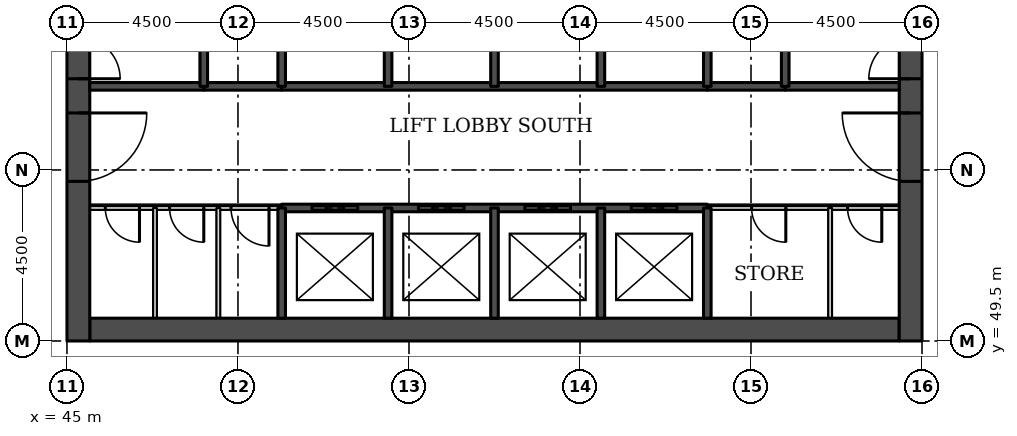
"""IFC4 building model, lengths in metres.
Left out: names, types, materials, properties, quantities, classifications, styles, units other than length and angle.
Written with IfcOpenShell. Run it as: python <this file> out.ifc"""

import sys

from ifc_helpers import new_model, si_unit, direction, frame, frame_2d, origin, place, context, subcontext, project, spatial, rectangle, extrude, element, fill, save


model = new_model("IFC4")
c1 = context("Model", 3, precision=1e-05, world=origin(), true_north=direction((0.0, 1.0)))
c2 = subcontext(c1, "Body", "Model", "MODEL_VIEW")
j1 = project(units=[si_unit("LENGTHUNIT", "METRE"), si_unit("PLANEANGLEUNIT", "RADIAN")], contexts=[c1])
p1 = place(None, origin())
s1 = spatial("IfcSite", under=j1, at=p1, CompositionType="ELEMENT")
p2 = place(p1, origin())
s2 = spatial("IfcBuilding", under=s1, at=p2, CompositionType="ELEMENT")
p3 = place(p2, frame((0.0, 0.0, 8.0)))
s3 = spatial("IfcBuildingStorey", under=s2, at=p3, CompositionType="ELEMENT", Elevation=8.0)
p4 = place(p3, frame((45.6, 49.8, 0.0), z_axis=(0.0, 0.0, 1.0), x_axis=(1.0, 0.0, 0.0)))
e1 = element("IfcWall", 1, at=p4, inside=s3, PredefinedType="SHEAR", context=c2, shape_type="SweptSolid", body=[
    extrude(rectangle(XDim=21.3, YDim=0.6, at=frame_2d((10.65, 0.0))), origin(), (0.0, 0.0, 1.0), 5.5),
])
p5 = place(p3, frame((45.3, 49.5, 0.0), z_axis=(0.0, 0.0, 1.0), x_axis=(0.0, 1.0, 0.0)))
e2 = element("IfcWall", 2, at=p5, inside=s3, PredefinedType="SHEAR", context=c2, shape_type="SweptSolid", body=[
    extrude(rectangle(XDim=22.5, YDim=0.6, at=frame_2d((11.25, 0.0))), origin(), (0.0, 0.0, 1.0), 5.5),
])
p6 = place(p5, frame((4.2, 0.0, 0.0)))
e3 = element("IfcOpeningElement", 3, at=p6, cuts=e2, PredefinedType="OPENING", context=c2, shape_type="SweptSolid", body=[
    extrude(rectangle(XDim=1.8, YDim=2.1, at=frame_2d((0.9, 1.05))), frame((0.0, 0.31, 0.0), z_axis=(0.0, -1.0, 0.0), x_axis=(1.0, 0.0, 0.0)), (0.0, 0.0, 1.0), 0.62),
])
p7 = place(p5, frame((6.9, 0.0, 0.0)))
e4 = element("IfcOpeningElement", 4, at=p7, cuts=e2, PredefinedType="OPENING", context=c2, shape_type="SweptSolid", body=[
    extrude(rectangle(XDim=1.1, YDim=2.1, at=frame_2d((0.55, 1.05))), frame((0.0, 0.31, 0.0), z_axis=(0.0, -1.0, 0.0), x_axis=(1.0, 0.0, 0.0)), (0.0, 0.0, 1.0), 0.62),
])
p8 = place(p5, frame((13.6, 0.0, 0.0)))
e5 = element("IfcOpeningElement", 5, at=p8, cuts=e2, PredefinedType="OPENING", context=c2, shape_type="SweptSolid", body=[
    extrude(rectangle(XDim=1.1, YDim=2.1, at=frame_2d((0.55, 1.05))), frame((0.0, 0.31, 0.0), z_axis=(0.0, -1.0, 0.0), x_axis=(1.0, 0.0, 0.0)), (0.0, 0.0, 1.0), 0.62),
])
p9 = place(p5, frame((16.5, 0.0, 0.0)))
e6 = element("IfcOpeningElement", 6, at=p9, cuts=e2, PredefinedType="OPENING", context=c2, shape_type="SweptSolid", body=[
    extrude(rectangle(XDim=1.8, YDim=2.1, at=frame_2d((0.9, 1.05))), frame((0.0, 0.31, 0.0), z_axis=(0.0, -1.0, 0.0), x_axis=(1.0, 0.0, 0.0)), (0.0, 0.0, 1.0), 0.62),
])
p10 = place(p3, frame((67.2, 49.5, 0.0), z_axis=(0.0, 0.0, 1.0), x_axis=(0.0, 1.0, 0.0)))
e7 = element("IfcWall", 7, at=p10, inside=s3, PredefinedType="SHEAR", context=c2, shape_type="SweptSolid", body=[
    extrude(rectangle(XDim=22.5, YDim=0.6, at=frame_2d((11.25, 0.0))), origin(), (0.0, 0.0, 1.0), 5.5),
])
p11 = place(p10, frame((4.2, 0.0, 0.0)))
e8 = element("IfcOpeningElement", 8, at=p11, cuts=e7, PredefinedType="OPENING", context=c2, shape_type="SweptSolid", body=[
    extrude(rectangle(XDim=1.8, YDim=2.1, at=frame_2d((0.9, 1.05))), frame((0.0, 0.31, 0.0), z_axis=(0.0, -1.0, 0.0), x_axis=(1.0, 0.0, 0.0)), (0.0, 0.0, 1.0), 0.62),
])
p12 = place(p10, frame((6.9, 0.0, 0.0)))
e9 = element("IfcOpeningElement", 9, at=p12, cuts=e7, PredefinedType="OPENING", context=c2, shape_type="SweptSolid", body=[
    extrude(rectangle(XDim=1.1, YDim=2.1, at=frame_2d((0.55, 1.05))), frame((0.0, 0.31, 0.0), z_axis=(0.0, -1.0, 0.0), x_axis=(1.0, 0.0, 0.0)), (0.0, 0.0, 1.0), 0.62),
])
p13 = place(p10, frame((13.6, 0.0, 0.0)))
e10 = element("IfcOpeningElement", 10, at=p13, cuts=e7, PredefinedType="OPENING", context=c2, shape_type="SweptSolid", body=[
    extrude(rectangle(XDim=1.1, YDim=2.1, at=frame_2d((0.55, 1.05))), frame((0.0, 0.31, 0.0), z_axis=(0.0, -1.0, 0.0), x_axis=(1.0, 0.0, 0.0)), (0.0, 0.0, 1.0), 0.62),
])
p14 = place(p10, frame((16.5, 0.0, 0.0)))
e11 = element("IfcOpeningElement", 11, at=p14, cuts=e7, PredefinedType="OPENING", context=c2, shape_type="SweptSolid", body=[
    extrude(rectangle(XDim=1.8, YDim=2.1, at=frame_2d((0.9, 1.05))), frame((0.0, 0.31, 0.0), z_axis=(0.0, -1.0, 0.0), x_axis=(1.0, 0.0, 0.0)), (0.0, 0.0, 1.0), 0.62),
])
p15 = place(p3, frame((45.6, 53.0, 0.0), z_axis=(0.0, 0.0, 1.0), x_axis=(1.0, 0.0, 0.0)))
e12 = element("IfcWall", 12, at=p15, inside=s3, PredefinedType="PARTITIONING", context=c2, shape_type="SweptSolid", body=[
    extrude(rectangle(XDim=5.05, YDim=0.1, at=frame_2d((2.525, 0.0))), origin(), (0.0, 0.0, 1.0), 5.15),
])
p16 = place(p15, frame((0.408, 0.0, 0.0)))
e13 = element("IfcOpeningElement", 13, at=p16, cuts=e12, PredefinedType="OPENING", context=c2, shape_type="SweptSolid", body=[
    extrude(rectangle(XDim=0.9, YDim=2.1, at=frame_2d((0.45, 1.05))), frame((0.0, 0.06, 0.0), z_axis=(0.0, -1.0, 0.0), x_axis=(1.0, 0.0, 0.0)), (0.0, 0.0, 1.0), 0.12),
])
p17 = place(p15, frame((2.1, 0.0, 0.0)))
e14 = element("IfcOpeningElement", 14, at=p17, cuts=e12, PredefinedType="OPENING", context=c2, shape_type="SweptSolid", body=[
    extrude(rectangle(XDim=0.9, YDim=2.1, at=frame_2d((0.45, 1.05))), frame((0.0, 0.06, 0.0), z_axis=(0.0, -1.0, 0.0), x_axis=(1.0, 0.0, 0.0)), (0.0, 0.0, 1.0), 0.12),
])
p18 = place(p15, frame((3.717, 0.0, 0.0)))
e15 = element("IfcOpeningElement", 15, at=p18, cuts=e12, PredefinedType="OPENING", context=c2, shape_type="SweptSolid", body=[
    extrude(rectangle(XDim=1.0, YDim=2.1, at=frame_2d((0.5, 1.05))), frame((0.0, 0.06, 0.0), z_axis=(0.0, -1.0, 0.0), x_axis=(1.0, 0.0, 0.0)), (0.0, 0.0, 1.0), 0.12),
])
p19 = place(p3, frame((61.85, 53.0, 0.0), z_axis=(0.0, 0.0, 1.0), x_axis=(1.0, 0.0, 0.0)))
e16 = element("IfcWall", 16, at=p19, inside=s3, PredefinedType="PARTITIONING", context=c2, shape_type="SweptSolid", body=[
    extrude(rectangle(XDim=5.05, YDim=0.1, at=frame_2d((2.525, 0.0))), origin(), (0.0, 0.0, 1.0), 5.15),
])
p20 = place(p19, frame((3.691, 0.0, 0.0)))
e17 = element("IfcOpeningElement", 17, at=p20, cuts=e16, PredefinedType="OPENING", context=c2, shape_type="SweptSolid", body=[
    extrude(rectangle(XDim=0.9, YDim=2.1, at=frame_2d((0.45, 1.05))), frame((0.0, 0.06, 0.0), z_axis=(0.0, -1.0, 0.0), x_axis=(1.0, 0.0, 0.0)), (0.0, 0.0, 1.0), 0.12),
])
p21 = place(p19, frame((1.166, 0.0, 0.0)))
e18 = element("IfcOpeningElement", 18, at=p21, cuts=e16, PredefinedType="OPENING", context=c2, shape_type="SweptSolid", body=[
    extrude(rectangle(XDim=0.9, YDim=2.1, at=frame_2d((0.45, 1.05))), frame((0.0, 0.06, 0.0), z_axis=(0.0, -1.0, 0.0), x_axis=(1.0, 0.0, 0.0)), (0.0, 0.0, 1.0), 0.12),
])
p22 = place(p3, frame((50.65, 53.0, 0.0), z_axis=(0.0, 0.0, 1.0), x_axis=(1.0, 0.0, 0.0)))
e19 = element("IfcWall", 19, at=p22, inside=s3, PredefinedType="SOLIDWALL", context=c2, shape_type="SweptSolid", body=[
    extrude(rectangle(XDim=11.2, YDim=0.2, at=frame_2d((5.6, 0.0))), origin(), (0.0, 0.0, 1.0), 5.15),
])
p23 = place(p22, frame((0.8, 0.0, 0.0)))
e20 = element("IfcOpeningElement", 20, at=p23, cuts=e19, PredefinedType="OPENING", context=c2, shape_type="SweptSolid", body=[
    extrude(rectangle(XDim=1.2, YDim=2.1, at=frame_2d((0.6, 1.05))), frame((0.0, 0.11, 0.0), z_axis=(0.0, -1.0, 0.0), x_axis=(1.0, 0.0, 0.0)), (0.0, 0.0, 1.0), 0.22),
])
p24 = place(p22, frame((3.6, 0.0, 0.0)))
e21 = element("IfcOpeningElement", 21, at=p24, cuts=e19, PredefinedType="OPENING", context=c2, shape_type="SweptSolid", body=[
    extrude(rectangle(XDim=1.2, YDim=2.1, at=frame_2d((0.6, 1.05))), frame((0.0, 0.11, 0.0), z_axis=(0.0, -1.0, 0.0), x_axis=(1.0, 0.0, 0.0)), (0.0, 0.0, 1.0), 0.22),
])
p25 = place(p22, frame((6.4, 0.0, 0.0)))
e22 = element("IfcOpeningElement", 22, at=p25, cuts=e19, PredefinedType="OPENING", context=c2, shape_type="SweptSolid", body=[
    extrude(rectangle(XDim=1.2, YDim=2.1, at=frame_2d((0.6, 1.05))), frame((0.0, 0.11, 0.0), z_axis=(0.0, -1.0, 0.0), x_axis=(1.0, 0.0, 0.0)), (0.0, 0.0, 1.0), 0.22),
])
p26 = place(p22, frame((9.2, 0.0, 0.0)))
e23 = element("IfcOpeningElement", 23, at=p26, cuts=e19, PredefinedType="OPENING", context=c2, shape_type="SweptSolid", body=[
    extrude(rectangle(XDim=1.2, YDim=2.1, at=frame_2d((0.6, 1.05))), frame((0.0, 0.11, 0.0), z_axis=(0.0, -1.0, 0.0), x_axis=(1.0, 0.0, 0.0)), (0.0, 0.0, 1.0), 0.22),
])
for number, where, z_axis, x_axis in (
    (24, (48.6, 56.2, 0.0), (0.0, 0.0, 1.0), (1.0, 0.0, 0.0)),
    (25, (61.85, 56.2, 0.0), (0.0, 0.0, 1.0), (1.0, 0.0, 0.0)),
):
    element("IfcWall", number, at=place(p3, frame(where, z_axis=z_axis, x_axis=x_axis)), inside=s3, PredefinedType="SOLIDWALL", context=c2, shape_type="SweptSolid", body=[
        extrude(rectangle(XDim=2.05, YDim=0.2, at=frame_2d((1.025, 0.0))), origin(), (0.0, 0.0, 1.0), 5.15),
    ])
p27 = place(p3, frame((45.6, 56.2, 0.0), z_axis=(0.0, 0.0, 1.0), x_axis=(1.0, 0.0, 0.0)))
e26 = element("IfcWall", 26, at=p27, inside=s3, PredefinedType="SOLIDWALL", context=c2, shape_type="SweptSolid", body=[
    extrude(rectangle(XDim=3.0, YDim=0.2, at=frame_2d((1.5, 0.0))), origin(), (0.0, 0.0, 1.0), 5.15),
])
p28 = place(p3, frame((50.65, 56.2, 0.0), z_axis=(0.0, 0.0, 1.0), x_axis=(1.0, 0.0, 0.0)))
e27 = element("IfcWall", 27, at=p28, inside=s3, PredefinedType="SOLIDWALL", context=c2, shape_type="SweptSolid", body=[
    extrude(rectangle(XDim=11.2, YDim=0.2, at=frame_2d((5.6, 0.0))), origin(), (0.0, 0.0, 1.0), 5.15),
])
p29 = place(p3, frame((63.9, 56.2, 0.0), z_axis=(0.0, 0.0, 1.0), x_axis=(1.0, 0.0, 0.0)))
e28 = element("IfcWall", 28, at=p29, inside=s3, PredefinedType="SOLIDWALL", context=c2, shape_type="SweptSolid", body=[
    extrude(rectangle(XDim=3.0, YDim=0.2, at=frame_2d((1.5, 0.0))), origin(), (0.0, 0.0, 1.0), 5.15),
])
p30 = place(p3, frame((47.317, 50.1, 0.0), z_axis=(0.0, 0.0, 1.0), x_axis=(0.0, 1.0, 0.0)))
e29 = element("IfcWall", 29, at=p30, inside=s3, PredefinedType="PARTITIONING", context=c2, shape_type="SweptSolid", body=[
    extrude(rectangle(XDim=2.9, YDim=0.1, at=frame_2d((1.45, 0.0))), origin(), (0.0, 0.0, 1.0), 5.15),
])
p31 = place(p3, frame((48.6, 56.2, 0.0), z_axis=(0.0, 0.0, 1.0), x_axis=(0.0, 1.0, 0.0)))
e30 = element("IfcWall", 30, at=p31, inside=s3, PredefinedType="SOLIDWALL", context=c2, shape_type="SweptSolid", body=[
    extrude(rectangle(XDim=5.8, YDim=0.2, at=frame_2d((2.9, 0.0))), origin(), (0.0, 0.0, 1.0), 5.15),
])
p32 = place(p3, frame((48.983, 50.1, 0.0), z_axis=(0.0, 0.0, 1.0), x_axis=(0.0, 1.0, 0.0)))
e31 = element("IfcWall", 31, at=p32, inside=s3, PredefinedType="PARTITIONING", context=c2, shape_type="SweptSolid", body=[
    extrude(rectangle(XDim=2.9, YDim=0.1, at=frame_2d((1.45, 0.0))), origin(), (0.0, 0.0, 1.0), 5.15),
])
p33 = place(p3, frame((50.65, 50.1, 0.0), z_axis=(0.0, 0.0, 1.0), x_axis=(0.0, 1.0, 0.0)))
e32 = element("IfcWall", 32, at=p33, inside=s3, PredefinedType="SOLIDWALL", context=c2, shape_type="SweptSolid", body=[
    extrude(rectangle(XDim=2.9, YDim=0.2, at=frame_2d((1.45, 0.0))), origin(), (0.0, 0.0, 1.0), 5.15),
])
p34 = place(p3, frame((50.65, 56.2, 0.0), z_axis=(0.0, 0.0, 1.0), x_axis=(0.0, 1.0, 0.0)))
e33 = element("IfcWall", 33, at=p34, inside=s3, PredefinedType="SOLIDWALL", context=c2, shape_type="SweptSolid", body=[
    extrude(rectangle(XDim=2.8, YDim=0.2, at=frame_2d((1.4, 0.0))), origin(), (0.0, 0.0, 1.0), 5.15),
])
p35 = place(p3, frame((53.45, 50.1, 0.0), z_axis=(0.0, 0.0, 1.0), x_axis=(0.0, 1.0, 0.0)))
e34 = element("IfcWall", 34, at=p35, inside=s3, PredefinedType="SOLIDWALL", context=c2, shape_type="SweptSolid", body=[
    extrude(rectangle(XDim=2.9, YDim=0.2, at=frame_2d((1.45, 0.0))), origin(), (0.0, 0.0, 1.0), 5.15),
])
p36 = place(p3, frame((53.45, 56.2, 0.0), z_axis=(0.0, 0.0, 1.0), x_axis=(0.0, 1.0, 0.0)))
e35 = element("IfcWall", 35, at=p36, inside=s3, PredefinedType="SOLIDWALL", context=c2, shape_type="SweptSolid", body=[
    extrude(rectangle(XDim=2.8, YDim=0.2, at=frame_2d((1.4, 0.0))), origin(), (0.0, 0.0, 1.0), 5.15),
])
p37 = place(p3, frame((56.25, 50.1, 0.0), z_axis=(0.0, 0.0, 1.0), x_axis=(0.0, 1.0, 0.0)))
e36 = element("IfcWall", 36, at=p37, inside=s3, PredefinedType="SOLIDWALL", context=c2, shape_type="SweptSolid", body=[
    extrude(rectangle(XDim=2.9, YDim=0.2, at=frame_2d((1.45, 0.0))), origin(), (0.0, 0.0, 1.0), 5.15),
])
p38 = place(p3, frame((56.25, 56.2, 0.0), z_axis=(0.0, 0.0, 1.0), x_axis=(0.0, 1.0, 0.0)))
e37 = element("IfcWall", 37, at=p38, inside=s3, PredefinedType="SOLIDWALL", context=c2, shape_type="SweptSolid", body=[
    extrude(rectangle(XDim=2.8, YDim=0.2, at=frame_2d((1.4, 0.0))), origin(), (0.0, 0.0, 1.0), 5.15),
])
p39 = place(p3, frame((59.05, 50.1, 0.0), z_axis=(0.0, 0.0, 1.0), x_axis=(0.0, 1.0, 0.0)))
e38 = element("IfcWall", 38, at=p39, inside=s3, PredefinedType="SOLIDWALL", context=c2, shape_type="SweptSolid", body=[
    extrude(rectangle(XDim=2.9, YDim=0.2, at=frame_2d((1.45, 0.0))), origin(), (0.0, 0.0, 1.0), 5.15),
])
p40 = place(p3, frame((59.05, 56.2, 0.0), z_axis=(0.0, 0.0, 1.0), x_axis=(0.0, 1.0, 0.0)))
e39 = element("IfcWall", 39, at=p40, inside=s3, PredefinedType="SOLIDWALL", context=c2, shape_type="SweptSolid", body=[
    extrude(rectangle(XDim=2.8, YDim=0.2, at=frame_2d((1.4, 0.0))), origin(), (0.0, 0.0, 1.0), 5.15),
])
p41 = place(p3, frame((61.85, 50.1, 0.0), z_axis=(0.0, 0.0, 1.0), x_axis=(0.0, 1.0, 0.0)))
e40 = element("IfcWall", 40, at=p41, inside=s3, PredefinedType="SOLIDWALL", context=c2, shape_type="SweptSolid", body=[
    extrude(rectangle(XDim=2.9, YDim=0.2, at=frame_2d((1.45, 0.0))), origin(), (0.0, 0.0, 1.0), 5.15),
])
p42 = place(p3, frame((61.85, 56.2, 0.0), z_axis=(0.0, 0.0, 1.0), x_axis=(0.0, 1.0, 0.0)))
e41 = element("IfcWall", 41, at=p42, inside=s3, PredefinedType="SOLIDWALL", context=c2, shape_type="SweptSolid", body=[
    extrude(rectangle(XDim=2.8, YDim=0.2, at=frame_2d((1.4, 0.0))), origin(), (0.0, 0.0, 1.0), 5.15),
])
p43 = place(p3, frame((63.9, 56.2, 0.0), z_axis=(0.0, 0.0, 1.0), x_axis=(0.0, 1.0, 0.0)))
e42 = element("IfcWall", 42, at=p43, inside=s3, PredefinedType="SOLIDWALL", context=c2, shape_type="SweptSolid", body=[
    extrude(rectangle(XDim=5.8, YDim=0.2, at=frame_2d((2.9, 0.0))), origin(), (0.0, 0.0, 1.0), 5.15),
])
p44 = place(p3, frame((65.082, 50.1, 0.0), z_axis=(0.0, 0.0, 1.0), x_axis=(0.0, 1.0, 0.0)))
e43 = element("IfcWall", 43, at=p44, inside=s3, PredefinedType="PARTITIONING", context=c2, shape_type="SweptSolid", body=[
    extrude(rectangle(XDim=2.9, YDim=0.1, at=frame_2d((1.45, 0.0))), origin(), (0.0, 0.0, 1.0), 5.15),
])
p45 = place(p23, origin())
e44 = element("IfcDoor", 44, at=p45, inside=s3, OperationType="DOUBLE_DOOR_SLIDING", PredefinedType="DOOR", context=c2, shape_type="SweptSolid", body=[
    extrude(rectangle(XDim=1.2, YDim=2.1, at=frame_2d((0.6, 1.05))), frame((0.0, 0.025, 0.0), z_axis=(0.0, -1.0, 0.0), x_axis=(1.0, 0.0, 0.0)), (0.0, 0.0, 1.0), 0.05),
])
fill(e20, e44)
p46 = place(p24, origin())
e45 = element("IfcDoor", 45, at=p46, inside=s3, OperationType="DOUBLE_DOOR_SLIDING", PredefinedType="DOOR", context=c2, shape_type="SweptSolid", body=[
    extrude(rectangle(XDim=1.2, YDim=2.1, at=frame_2d((0.6, 1.05))), frame((0.0, 0.025, 0.0), z_axis=(0.0, -1.0, 0.0), x_axis=(1.0, 0.0, 0.0)), (0.0, 0.0, 1.0), 0.05),
])
fill(e21, e45)
p47 = place(p25, origin())
e46 = element("IfcDoor", 46, at=p47, inside=s3, OperationType="DOUBLE_DOOR_SLIDING", PredefinedType="DOOR", context=c2, shape_type="SweptSolid", body=[
    extrude(rectangle(XDim=1.2, YDim=2.1, at=frame_2d((0.6, 1.05))), frame((0.0, 0.025, 0.0), z_axis=(0.0, -1.0, 0.0), x_axis=(1.0, 0.0, 0.0)), (0.0, 0.0, 1.0), 0.05),
])
fill(e22, e46)
p48 = place(p26, origin())
e47 = element("IfcDoor", 47, at=p48, inside=s3, OperationType="DOUBLE_DOOR_SLIDING", PredefinedType="DOOR", context=c2, shape_type="SweptSolid", body=[
    extrude(rectangle(XDim=1.2, YDim=2.1, at=frame_2d((0.6, 1.05))), frame((0.0, 0.025, 0.0), z_axis=(0.0, -1.0, 0.0), x_axis=(1.0, 0.0, 0.0)), (0.0, 0.0, 1.0), 0.05),
])
fill(e23, e47)
p49 = place(p6, frame((1.8, 0.0, 0.0), z_axis=(0.0, 0.0, 1.0), x_axis=(-1.0, 0.0, 0.0)))
e48 = element("IfcDoor", 48, at=p49, inside=s3, OperationType="SINGLE_SWING_LEFT", PredefinedType="DOOR", context=c2, shape_type="SweptSolid", body=[
    extrude(rectangle(XDim=1.8, YDim=2.1, at=frame_2d((0.9, 1.05))), frame((0.0, 0.025, 0.0), z_axis=(0.0, -1.0, 0.0), x_axis=(1.0, 0.0, 0.0)), (0.0, 0.0, 1.0), 0.05),
])
fill(e3, e48)
p50 = place(p7, frame((1.1, 0.0, 0.0), z_axis=(0.0, 0.0, 1.0), x_axis=(-1.0, 0.0, 0.0)))
e49 = element("IfcDoor", 49, at=p50, inside=s3, OperationType="SINGLE_SWING_RIGHT", PredefinedType="DOOR", context=c2, shape_type="SweptSolid", body=[
    extrude(rectangle(XDim=1.1, YDim=2.1, at=frame_2d((0.55, 1.05))), frame((0.0, 0.025, 0.0), z_axis=(0.0, -1.0, 0.0), x_axis=(1.0, 0.0, 0.0)), (0.0, 0.0, 1.0), 0.05),
])
fill(e4, e49)
p51 = place(p11, origin())
e50 = element("IfcDoor", 50, at=p51, inside=s3, OperationType="SINGLE_SWING_RIGHT", PredefinedType="DOOR", context=c2, shape_type="SweptSolid", body=[
    extrude(rectangle(XDim=1.8, YDim=2.1, at=frame_2d((0.9, 1.05))), frame((0.0, 0.025, 0.0), z_axis=(0.0, -1.0, 0.0), x_axis=(1.0, 0.0, 0.0)), (0.0, 0.0, 1.0), 0.05),
])
fill(e8, e50)
p52 = place(p12, origin())
e51 = element("IfcDoor", 51, at=p52, inside=s3, OperationType="SINGLE_SWING_LEFT", PredefinedType="DOOR", context=c2, shape_type="SweptSolid", body=[
    extrude(rectangle(XDim=1.1, YDim=2.1, at=frame_2d((0.55, 1.05))), frame((0.0, 0.025, 0.0), z_axis=(0.0, -1.0, 0.0), x_axis=(1.0, 0.0, 0.0)), (0.0, 0.0, 1.0), 0.05),
])
fill(e9, e51)
p53 = place(p20, frame((0.9, 0.0, 0.0), z_axis=(0.0, 0.0, 1.0), x_axis=(-1.0, 0.0, 0.0)))
e52 = element("IfcDoor", 52, at=p53, inside=s3, OperationType="SINGLE_SWING_LEFT", PredefinedType="DOOR", context=c2, shape_type="SweptSolid", body=[
    extrude(rectangle(XDim=0.9, YDim=2.1, at=frame_2d((0.45, 1.05))), frame((0.0, 0.025, 0.0), z_axis=(0.0, -1.0, 0.0), x_axis=(1.0, 0.0, 0.0)), (0.0, 0.0, 1.0), 0.05),
])
fill(e17, e52)
p54 = place(p21, frame((0.9, 0.0, 0.0), z_axis=(0.0, 0.0, 1.0), x_axis=(-1.0, 0.0, 0.0)))
e53 = element("IfcDoor", 53, at=p54, inside=s3, OperationType="SINGLE_SWING_LEFT", PredefinedType="DOOR", context=c2, shape_type="SweptSolid", body=[
    extrude(rectangle(XDim=0.9, YDim=2.1, at=frame_2d((0.45, 1.05))), frame((0.0, 0.025, 0.0), z_axis=(0.0, -1.0, 0.0), x_axis=(1.0, 0.0, 0.0)), (0.0, 0.0, 1.0), 0.05),
])
fill(e18, e53)
p55 = place(p16, frame((0.9, 0.0, 0.0), z_axis=(0.0, 0.0, 1.0), x_axis=(-1.0, 0.0, 0.0)))
e54 = element("IfcDoor", 54, at=p55, inside=s3, OperationType="SINGLE_SWING_LEFT", PredefinedType="DOOR", context=c2, shape_type="SweptSolid", body=[
    extrude(rectangle(XDim=0.9, YDim=2.1, at=frame_2d((0.45, 1.05))), frame((0.0, 0.025, 0.0), z_axis=(0.0, -1.0, 0.0), x_axis=(1.0, 0.0, 0.0)), (0.0, 0.0, 1.0), 0.05),
])
fill(e13, e54)
p56 = place(p17, frame((0.9, 0.0, 0.0), z_axis=(0.0, 0.0, 1.0), x_axis=(-1.0, 0.0, 0.0)))
e55 = element("IfcDoor", 55, at=p56, inside=s3, OperationType="SINGLE_SWING_LEFT", PredefinedType="DOOR", context=c2, shape_type="SweptSolid", body=[
    extrude(rectangle(XDim=0.9, YDim=2.1, at=frame_2d((0.45, 1.05))), frame((0.0, 0.025, 0.0), z_axis=(0.0, -1.0, 0.0), x_axis=(1.0, 0.0, 0.0)), (0.0, 0.0, 1.0), 0.05),
])
fill(e14, e55)
p57 = place(p18, frame((1.0, 0.0, 0.0), z_axis=(0.0, 0.0, 1.0), x_axis=(-1.0, 0.0, 0.0)))
e56 = element("IfcDoor", 56, at=p57, inside=s3, OperationType="SINGLE_SWING_LEFT", PredefinedType="DOOR", context=c2, shape_type="SweptSolid", body=[
    extrude(rectangle(XDim=1.0, YDim=2.1, at=frame_2d((0.5, 1.05))), frame((0.0, 0.025, 0.0), z_axis=(0.0, -1.0, 0.0), x_axis=(1.0, 0.0, 0.0)), (0.0, 0.0, 1.0), 0.05),
])
fill(e15, e56)
save(model, sys.argv[1])
